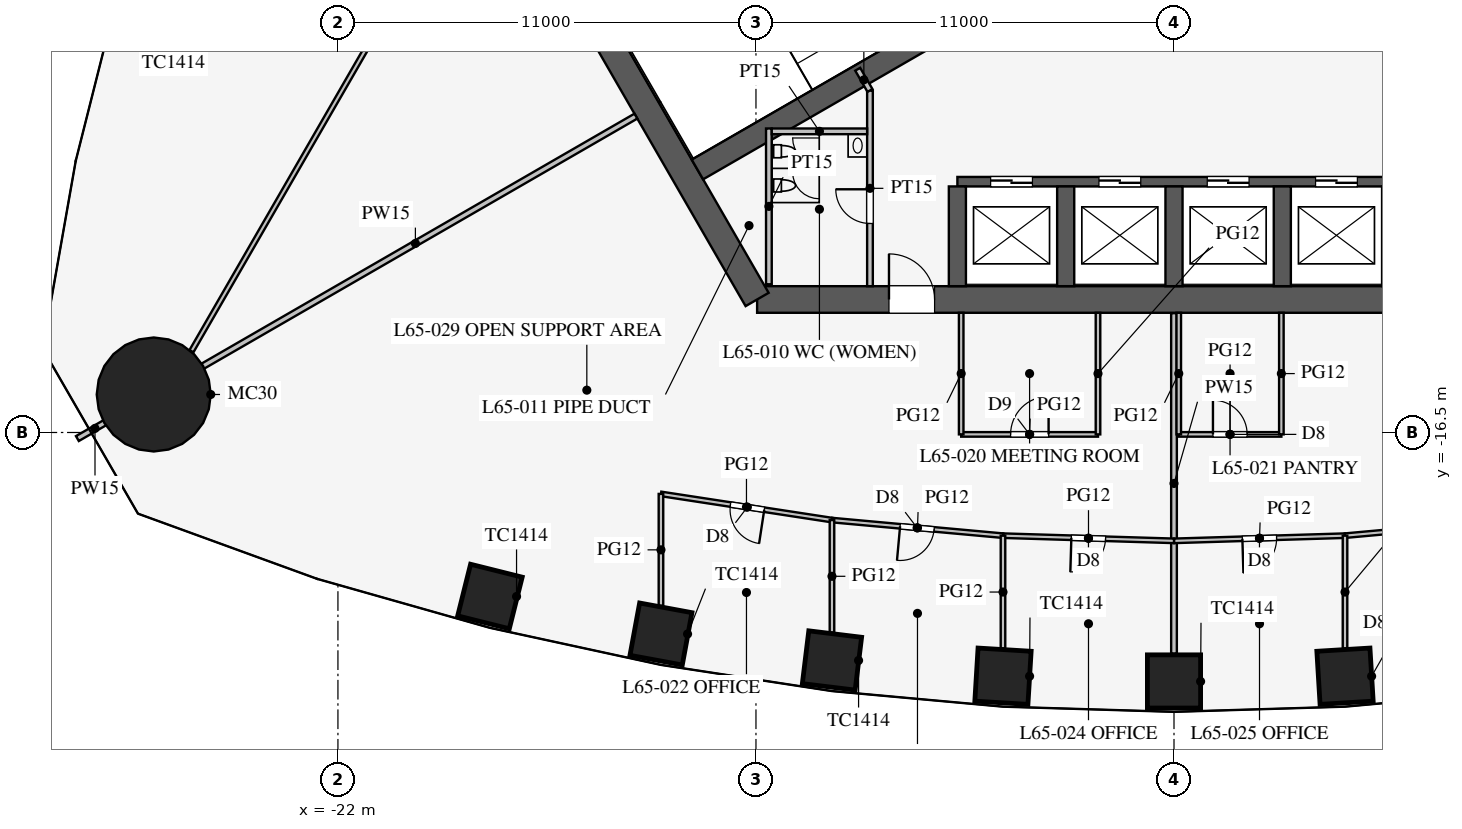
"""IFC4 building model, lengths in metres.
Left out: names, types, materials, properties, quantities, classifications, styles, units other than length and angle.
Written with IfcOpenShell. Run it as: python <this file> out.ifc"""

import sys

from ifc_helpers import new_model, si_unit, direction, frame, frame_2d, origin, origin_2d, place, context, subcontext, project, spatial, rectangle, circle, extrude, element, fill, save


model = new_model("IFC4")
c1 = context("Model", 3, precision=1e-05, world=origin(), true_north=direction((0.0, 1.0)))
c2 = subcontext(c1, "Body", "Model", "MODEL_VIEW")
j1 = project(units=[si_unit("LENGTHUNIT", "METRE"), si_unit("PLANEANGLEUNIT", "RADIAN")], contexts=[c1])
p1 = place(None, origin())
s1 = spatial("IfcSite", under=j1, at=p1, CompositionType="ELEMENT")
p2 = place(p1, origin())
s2 = spatial("IfcBuilding", under=s1, at=p2, CompositionType="ELEMENT")
p3 = place(p2, frame((0.0, 0.0, 284.7)))
s3 = spatial("IfcBuildingStorey", under=s2, at=p3, CompositionType="ELEMENT", Elevation=284.7)
for number, where, z_axis, x_axis in (
    (1, (-18.0, -20.816, 0.0), (0.0, 0.0, 1.0), (0.97, -0.242, 0.0)),
    (2, (-13.5, -21.803, 0.0), (0.0, 0.0, 1.0), (0.983, -0.182, 0.0)),
    (3, (-9.0, -22.499, 0.0), (0.0, 0.0, 1.0), (0.993, -0.121, 0.0)),
    (4, (-4.5, -22.914, 0.0), (0.0, 0.0, 1.0), (0.998, -0.061, 0.0)),
    (5, (0.0, -23.052, 0.0), (0.0, 0.0, 1.0), (1.0, 0.0, 0.0)),
    (6, (4.5, -22.914, 0.0), (0.0, 0.0, 1.0), (0.998, 0.061, 0.0)),
):
    element("IfcColumn", number, at=place(p3, frame(where, z_axis=z_axis, x_axis=x_axis)), inside=s3, PredefinedType="COLUMN", context=c2, shape_type="SweptSolid", body=[
        extrude(rectangle(XDim=1.4, YDim=1.4, at=origin_2d()), origin(), (0.0, 0.0, 1.0), 4.2),
    ])
p4 = place(p3, frame((-26.847, -15.5, 0.0), z_axis=(0.0, 0.0, 1.0), x_axis=(1.0, 0.0, 0.0)))
e7 = element("IfcColumn", 7, at=p4, inside=s3, PredefinedType="COLUMN", context=c2, shape_type="SweptSolid", body=[
    extrude(circle(Radius=1.5, at=origin_2d()), origin(), (0.0, 0.0, 1.0), 4.2),
])
p5 = place(p3, frame((-10.97, -13.0, 0.0), z_axis=(0.0, 0.0, 1.0), x_axis=(1.0, 0.0, 0.0)))
e8 = element("IfcWall", 8, at=p5, inside=s3, PredefinedType="SHEAR", context=c2, shape_type="SweptSolid", body=[
    extrude(rectangle(XDim=21.939, YDim=0.7, at=frame_2d((10.97, 0.0))), origin(), (0.0, 0.0, 1.0), 4.2),
])
p6 = place(p5, frame((17.27, 0.0, 0.0)))
e9 = element("IfcOpeningElement", 9, at=p6, cuts=e8, PredefinedType="OPENING", context=c2, shape_type="SweptSolid", body=[
    extrude(rectangle(XDim=1.2, YDim=2.1, at=frame_2d((0.6, 1.05))), frame((0.0, 0.36, 0.0), z_axis=(0.0, -1.0, 0.0), x_axis=(1.0, 0.0, 0.0)), (0.0, 0.0, 1.0), 0.72),
])
p7 = place(p5, frame((3.47, 0.0, 0.0)))
e10 = element("IfcOpeningElement", 10, at=p7, cuts=e8, PredefinedType="OPENING", context=c2, shape_type="SweptSolid", body=[
    extrude(rectangle(XDim=1.2, YDim=2.1, at=frame_2d((0.6, 1.05))), frame((0.0, 0.36, 0.0), z_axis=(0.0, -1.0, 0.0), x_axis=(1.0, 0.0, 0.0)), (0.0, 0.0, 1.0), 0.72),
])
p8 = place(p3, frame((-16.743, -3.0, 0.0), z_axis=(0.0, 0.0, 1.0), x_axis=(0.499995765644, -0.866027848477, 0.0)))
e11 = element("IfcWall", 11, at=p8, inside=s3, PredefinedType="SHEAR", context=c2, shape_type="SweptSolid", body=[
    extrude(rectangle(XDim=11.547, YDim=0.7, at=frame_2d((5.773, 0.0))), origin(), (0.0, 0.0, 1.0), 4.2),
])
p9 = place(p3, frame((-5.7, -9.9, 0.0), z_axis=(0.0, 0.0, 1.0), x_axis=(1.0, 0.0, 0.0)))
e12 = element("IfcWall", 12, at=p9, inside=s3, PredefinedType="SHEAR", context=c2, shape_type="SweptSolid", body=[
    extrude(rectangle(XDim=11.4, YDim=0.25, at=frame_2d((5.7, 0.0))), origin(), (0.0, 0.0, 1.0), 4.2),
])
p10 = place(p9, frame((0.875, 0.0, 0.0)))
e13 = element("IfcOpeningElement", 13, at=p10, cuts=e12, PredefinedType="OPENING", context=c2, shape_type="SweptSolid", body=[
    extrude(rectangle(XDim=1.1, YDim=2.2, at=frame_2d((0.55, 1.1))), frame((0.0, 0.135, 0.0), z_axis=(0.0, -1.0, 0.0), x_axis=(1.0, 0.0, 0.0)), (0.0, 0.0, 1.0), 0.27),
])
p11 = place(p9, frame((3.725, 0.0, 0.0)))
e14 = element("IfcOpeningElement", 14, at=p11, cuts=e12, PredefinedType="OPENING", context=c2, shape_type="SweptSolid", body=[
    extrude(rectangle(XDim=1.1, YDim=2.2, at=frame_2d((0.55, 1.1))), frame((0.0, 0.135, 0.0), z_axis=(0.0, -1.0, 0.0), x_axis=(1.0, 0.0, 0.0)), (0.0, 0.0, 1.0), 0.27),
])
p12 = place(p9, frame((6.575, 0.0, 0.0)))
e15 = element("IfcOpeningElement", 15, at=p12, cuts=e12, PredefinedType="OPENING", context=c2, shape_type="SweptSolid", body=[
    extrude(rectangle(XDim=1.1, YDim=2.2, at=frame_2d((0.55, 1.1))), frame((0.0, 0.135, 0.0), z_axis=(0.0, -1.0, 0.0), x_axis=(1.0, 0.0, 0.0)), (0.0, 0.0, 1.0), 0.27),
])
p13 = place(p9, frame((9.425, 0.0, 0.0)))
e16 = element("IfcOpeningElement", 16, at=p13, cuts=e12, PredefinedType="OPENING", context=c2, shape_type="SweptSolid", body=[
    extrude(rectangle(XDim=1.1, YDim=2.2, at=frame_2d((0.55, 1.1))), frame((0.0, 0.135, 0.0), z_axis=(0.0, -1.0, 0.0), x_axis=(1.0, 0.0, 0.0)), (0.0, 0.0, 1.0), 0.27),
])
for number, where, z_axis, x_axis in (
    (17, (-5.7, -10.025, 0.0), (0.0, 0.0, 1.0), (0.0, -1.0, 0.0)),
    (18, (-2.85, -10.025, 0.0), (0.0, 0.0, 1.0), (0.0, -1.0, 0.0)),
    (19, (0.0, -10.025, 0.0), (0.0, 0.0, 1.0), (0.0, -1.0, 0.0)),
    (20, (2.85, -10.025, 0.0), (0.0, 0.0, 1.0), (0.0, -1.0, 0.0)),
    (21, (5.7, -10.025, 0.0), (0.0, 0.0, 1.0), (0.0, -1.0, 0.0)),
):
    element("IfcWall", number, at=place(p3, frame(where, z_axis=z_axis, x_axis=x_axis)), inside=s3, PredefinedType="SHEAR", context=c2, shape_type="SweptSolid", body=[
        extrude(rectangle(XDim=2.625, YDim=0.45, at=frame_2d((1.312, 0.0))), origin(), (0.0, 0.0, 1.0), 4.2),
    ])
for number, where, z_axis, x_axis in (
    (22, (4.638, -5.016, 0.0), (0.0, 0.0, 1.0), (0.866, -0.5, 0.0)),
    (23, (-4.638, -5.016, 0.0), (0.0, 0.0, 1.0), (-0.866, -0.5, 0.0)),
):
    element("IfcWall", number, at=place(p3, frame(where, z_axis=z_axis, x_axis=x_axis)), inside=s3, PredefinedType="SHEAR", context=c2, shape_type="SweptSolid", body=[
        extrude(rectangle(XDim=9.125, YDim=0.6, at=frame_2d((4.562, 0.0))), origin(), (0.0, 0.0, 1.0), 4.2),
    ])
p14 = place(p3, frame((-8.0, -7.5, 0.0), z_axis=(0.0, 0.0, 1.0), x_axis=(0.0, -1.0, 0.0)))
e24 = element("IfcWall", 24, at=p14, inside=s3, PredefinedType="PARTITIONING", context=c2, shape_type="SweptSolid", body=[
    extrude(rectangle(XDim=5.15, YDim=0.15, at=frame_2d((2.575, 0.0))), origin(), (0.0, 0.0, 1.0), 4.0),
])
p15 = place(p14, frame((2.6, 0.0, 0.0)))
e25 = element("IfcOpeningElement", 25, at=p15, cuts=e24, PredefinedType="OPENING", context=c2, shape_type="SweptSolid", body=[
    extrude(rectangle(XDim=0.9, YDim=2.1, at=frame_2d((0.45, 1.05))), frame((0.0, 0.085, 0.0), z_axis=(0.0, -1.0, 0.0), x_axis=(1.0, 0.0, 0.0)), (0.0, 0.0, 1.0), 0.17),
])
p16 = place(p3, frame((-8.0, -7.5, 0.0), z_axis=(0.0, 0.0, 1.0), x_axis=(-0.499842556608, 0.866116284689, 0.0)))
e26 = element("IfcWall", 26, at=p16, inside=s3, PredefinedType="PARTITIONING", context=c2, shape_type="SweptSolid", body=[
    extrude(rectangle(XDim=0.645, YDim=0.15, at=frame_2d((0.323, 0.0))), origin(), (0.0, 0.0, 1.0), 4.0),
])
p17 = place(p3, frame((-10.66, -8.5, 0.0), z_axis=(0.0, 0.0, 1.0), x_axis=(0.0, -1.0, 0.0)))
e27 = element("IfcWall", 27, at=p17, inside=s3, PredefinedType="PARTITIONING", context=c2, shape_type="SweptSolid", body=[
    extrude(rectangle(XDim=4.1, YDim=0.15, at=frame_2d((2.05, 0.0))), origin(), (0.0, 0.0, 1.0), 4.0),
])
p18 = place(p3, frame((-8.075, -8.575, 0.0), z_axis=(0.0, 0.0, 1.0), x_axis=(-1.0, 0.0, 0.0)))
e28 = element("IfcWall", 28, at=p18, inside=s3, PredefinedType="PARTITIONING", context=c2, shape_type="SweptSolid", body=[
    extrude(rectangle(XDim=2.51, YDim=0.15, at=frame_2d((1.255, 0.0))), origin(), (0.0, 0.0, 1.0), 4.0),
])
p19 = place(p3, frame((-14.159, -8.175, 0.0), z_axis=(0.0, 0.0, 1.0), x_axis=(-0.866026905467, -0.499997399001, 0.0)))
e29 = element("IfcWall", 29, at=p19, inside=s3, PredefinedType="PARTITIONING", context=c2, shape_type="SweptSolid", body=[
    extrude(rectangle(XDim=13.4, YDim=0.15, at=frame_2d((6.7, 0.0))), origin(), (0.0, 0.0, 1.0), 2.5),
])
p20 = place(p3, frame((-27.929, -16.125, 0.0), z_axis=(0.0, 0.0, 1.0), x_axis=(-0.866086810508, -0.499893625349, 0.0)))
e30 = element("IfcWall", 30, at=p20, inside=s3, PredefinedType="PARTITIONING", context=c2, shape_type="SweptSolid", body=[
    extrude(rectangle(XDim=1.07, YDim=0.15, at=frame_2d((0.535, 0.0))), origin(), (0.0, 0.0, 1.0), 2.5),
])
p21 = place(p3, frame((0.0, -13.36, 0.0), z_axis=(0.0, 0.0, 1.0), x_axis=(0.0, -1.0, 0.0)))
e31 = element("IfcWall", 31, at=p21, inside=s3, PredefinedType="PARTITIONING", context=c2, shape_type="SweptSolid", body=[
    extrude(rectangle(XDim=8.961, YDim=0.15, at=frame_2d((4.481, 0.0))), origin(), (0.0, 0.0, 1.0), 3.0),
])
p22 = place(p3, frame((0.125, -16.55, 0.0), z_axis=(0.0, 0.0, 1.0), x_axis=(1.0, 0.0, 0.0)))
e32 = element("IfcWall", 32, at=p22, inside=s3, PredefinedType="PARTITIONING", context=c2, shape_type="SweptSolid", body=[
    extrude(rectangle(XDim=2.7, YDim=0.12, at=frame_2d((1.35, 0.0))), origin(), (0.0, 0.0, 1.0), 2.9),
])
p23 = place(p22, frame((0.9, 0.0, 0.15)))
e33 = element("IfcOpeningElement", 33, at=p23, cuts=e32, PredefinedType="OPENING", context=c2, shape_type="SweptSolid", body=[
    extrude(rectangle(XDim=0.9, YDim=2.1, at=frame_2d((0.45, 1.05))), frame((0.0, 0.07, 0.0), z_axis=(0.0, -1.0, 0.0), x_axis=(1.0, 0.0, 0.0)), (0.0, 0.0, 1.0), 0.14),
])
p24 = place(p3, frame((-5.6, -16.55, 0.0), z_axis=(0.0, 0.0, 1.0), x_axis=(1.0, 0.0, 0.0)))
e34 = element("IfcWall", 34, at=p24, inside=s3, PredefinedType="PARTITIONING", context=c2, shape_type="SweptSolid", body=[
    extrude(rectangle(XDim=3.6, YDim=0.12, at=frame_2d((1.8, 0.0))), origin(), (0.0, 0.0, 1.0), 2.9),
])
p25 = place(p24, frame((1.3, 0.0, 0.15)))
e35 = element("IfcOpeningElement", 35, at=p25, cuts=e34, PredefinedType="OPENING", context=c2, shape_type="SweptSolid", body=[
    extrude(rectangle(XDim=1.0, YDim=2.1, at=frame_2d((0.5, 1.05))), frame((0.0, 0.07, 0.0), z_axis=(0.0, -1.0, 0.0), x_axis=(1.0, 0.0, 0.0)), (0.0, 0.0, 1.0), 0.14),
])
for number, where, z_axis, x_axis in (
    (36, (0.125, -13.35, 0.0), (0.0, 0.0, 1.0), (0.0, -1.0, 0.0)),
    (37, (2.825, -13.35, 0.0), (0.0, 0.0, 1.0), (0.0, -1.0, 0.0)),
    (38, (-2.0, -13.35, 0.0), (0.0, 0.0, 1.0), (0.0, -1.0, 0.0)),
    (39, (-5.6, -13.35, 0.0), (0.0, 0.0, 1.0), (0.0, -1.0, 0.0)),
):
    element("IfcWall", number, at=place(p3, frame(where, z_axis=z_axis, x_axis=x_axis)), inside=s3, PredefinedType="PARTITIONING", context=c2, shape_type="SweptSolid", body=[
        extrude(rectangle(XDim=3.2, YDim=0.12, at=frame_2d((1.6, 0.0))), origin(), (0.0, 0.0, 1.0), 2.9),
    ])
p26 = place(p3, frame((0.0, -19.352, 0.0), z_axis=(0.0, 0.0, 1.0), x_axis=(0.999542074227, 0.030259574513, 0.0)))
e40 = element("IfcWall", 40, at=p26, inside=s3, PredefinedType="PARTITIONING", context=c2, shape_type="SweptSolid", body=[
    extrude(rectangle(XDim=4.502, YDim=0.12, at=frame_2d((2.251, 0.0))), origin(), (0.0, 0.0, 1.0), 2.9),
])
p27 = place(p26, frame((1.8, 0.0, 0.15)))
e41 = element("IfcOpeningElement", 41, at=p27, cuts=e40, PredefinedType="OPENING", context=c2, shape_type="SweptSolid", body=[
    extrude(rectangle(XDim=0.9, YDim=2.1, at=frame_2d((0.45, 1.05))), frame((0.0, 0.07, 0.0), z_axis=(0.0, -1.0, 0.0), x_axis=(1.0, 0.0, 0.0)), (0.0, 0.0, 1.0), 0.14),
])
p28 = place(p3, frame((4.5, -19.215, 0.0), z_axis=(0.0, 0.0, 1.0), x_axis=(0.995871921504, 0.090769576179, 0.0)))
e42 = element("IfcWall", 42, at=p28, inside=s3, PredefinedType="PARTITIONING", context=c2, shape_type="SweptSolid", body=[
    extrude(rectangle(XDim=4.519, YDim=0.12, at=frame_2d((2.259, 0.0))), origin(), (0.0, 0.0, 1.0), 2.9),
])
p29 = place(p28, frame((1.8, 0.0, 0.15)))
e43 = element("IfcOpeningElement", 43, at=p29, cuts=e42, PredefinedType="OPENING", context=c2, shape_type="SweptSolid", body=[
    extrude(rectangle(XDim=0.9, YDim=2.1, at=frame_2d((0.45, 1.05))), frame((0.0, 0.07, 0.0), z_axis=(0.0, -1.0, 0.0), x_axis=(1.0, 0.0, 0.0)), (0.0, 0.0, 1.0), 0.14),
])
p30 = place(p3, frame((-13.5, -18.116, 0.0), z_axis=(0.0, 0.0, 1.0), x_axis=(0.988481794406, -0.151339823341, 0.0)))
e44 = element("IfcWall", 44, at=p30, inside=s3, PredefinedType="PARTITIONING", context=c2, shape_type="SweptSolid", body=[
    extrude(rectangle(XDim=4.552, YDim=0.12, at=frame_2d((2.276, 0.0))), origin(), (0.0, 0.0, 1.0), 2.9),
])
p31 = place(p30, frame((1.85, 0.0, 0.15)))
e45 = element("IfcOpeningElement", 45, at=p31, cuts=e44, PredefinedType="OPENING", context=c2, shape_type="SweptSolid", body=[
    extrude(rectangle(XDim=0.9, YDim=2.1, at=frame_2d((0.45, 1.05))), frame((0.0, 0.07, 0.0), z_axis=(0.0, -1.0, 0.0), x_axis=(1.0, 0.0, 0.0)), (0.0, 0.0, 1.0), 0.14),
])
p32 = place(p3, frame((-4.5, -19.215, 0.0), z_axis=(0.0, 0.0, 1.0), x_axis=(0.999542074227, -0.030259574513, 0.0)))
e46 = element("IfcWall", 46, at=p32, inside=s3, PredefinedType="PARTITIONING", context=c2, shape_type="SweptSolid", body=[
    extrude(rectangle(XDim=4.502, YDim=0.12, at=frame_2d((2.251, 0.0))), origin(), (0.0, 0.0, 1.0), 2.9),
])
p33 = place(p32, frame((1.8, 0.0, 0.15)))
e47 = element("IfcOpeningElement", 47, at=p33, cuts=e46, PredefinedType="OPENING", context=c2, shape_type="SweptSolid", body=[
    extrude(rectangle(XDim=0.9, YDim=2.1, at=frame_2d((0.45, 1.05))), frame((0.0, 0.07, 0.0), z_axis=(0.0, -1.0, 0.0), x_axis=(1.0, 0.0, 0.0)), (0.0, 0.0, 1.0), 0.14),
])
p34 = place(p3, frame((-9.0, -18.805, 0.0), z_axis=(0.0, 0.0, 1.0), x_axis=(0.995871921504, -0.090769576179, 0.0)))
e48 = element("IfcWall", 48, at=p34, inside=s3, PredefinedType="PARTITIONING", context=c2, shape_type="SweptSolid", body=[
    extrude(rectangle(XDim=4.519, YDim=0.12, at=frame_2d((2.259, 0.0))), origin(), (0.0, 0.0, 1.0), 2.9),
])
p35 = place(p34, frame((1.8, 0.0, 0.15)))
e49 = element("IfcOpeningElement", 49, at=p35, cuts=e48, PredefinedType="OPENING", context=c2, shape_type="SweptSolid", body=[
    extrude(rectangle(XDim=0.9, YDim=2.1, at=frame_2d((0.45, 1.05))), frame((0.0, 0.07, 0.0), z_axis=(0.0, -1.0, 0.0), x_axis=(1.0, 0.0, 0.0)), (0.0, 0.0, 1.0), 0.14),
])
p36 = place(p3, frame((4.5, -19.215, 0.0), z_axis=(0.0, 0.0, 1.0), x_axis=(0.0, -1.0, 0.0)))
e50 = element("IfcWall", 50, at=p36, inside=s3, PredefinedType="PARTITIONING", context=c2, shape_type="SweptSolid", body=[
    extrude(rectangle(XDim=2.967, YDim=0.12, at=frame_2d((1.484, 0.0))), origin(), (0.0, 0.0, 1.0), 2.9),
])
p37 = place(p3, frame((-13.5, -18.116, 0.0), z_axis=(0.0, 0.0, 1.0), x_axis=(0.0, -1.0, 0.0)))
e51 = element("IfcWall", 51, at=p37, inside=s3, PredefinedType="PARTITIONING", context=c2, shape_type="SweptSolid", body=[
    extrude(rectangle(XDim=2.944, YDim=0.12, at=frame_2d((1.472, 0.0))), origin(), (0.0, 0.0, 1.0), 2.8),
])
p38 = place(p3, frame((-4.5, -19.215, 0.0), z_axis=(0.0, 0.0, 1.0), x_axis=(0.0, -1.0, 0.0)))
e52 = element("IfcWall", 52, at=p38, inside=s3, PredefinedType="PARTITIONING", context=c2, shape_type="SweptSolid", body=[
    extrude(rectangle(XDim=2.967, YDim=0.12, at=frame_2d((1.484, 0.0))), origin(), (0.0, 0.0, 1.0), 2.9),
])
p39 = place(p3, frame((-9.0, -18.805, 0.0), z_axis=(0.0, 0.0, 1.0), x_axis=(0.0, -1.0, 0.0)))
e53 = element("IfcWall", 53, at=p39, inside=s3, PredefinedType="PARTITIONING", context=c2, shape_type="SweptSolid", body=[
    extrude(rectangle(XDim=2.959, YDim=0.12, at=frame_2d((1.479, 0.0))), origin(), (0.0, 0.0, 1.0), 2.9),
])
p40 = place(p3, frame((-0.49, 29.571, 0.0), z_axis=(0.0, 0.0, 1.0), x_axis=(-0.499999496503, -0.866025694478, 0.0)))
e54 = element("IfcWall", 54, at=p40, inside=s3, PredefinedType="PARTITIONING", context=c2, shape_type="SweptSolid", body=[
    extrude(rectangle(XDim=50.728, YDim=0.12, at=frame_2d((25.364, 0.0))), origin(), (0.0, 0.0, 1.0), 2.9),
])
p41 = place(p40, frame((9.8, 0.0, 0.15)))
e55 = element("IfcOpeningElement", 55, at=p41, cuts=e54, PredefinedType="OPENING", context=c2, shape_type="SweptSolid", body=[
    extrude(rectangle(XDim=1.8, YDim=2.1, at=frame_2d((0.9, 1.05))), frame((0.0, 0.07, 0.0), z_axis=(0.0, -1.0, 0.0), x_axis=(1.0, 0.0, 0.0)), (0.0, 0.0, 1.0), 0.14),
])
p42 = place(p40, frame((39.15, 0.0, 0.15)))
e56 = element("IfcOpeningElement", 56, at=p42, cuts=e54, PredefinedType="OPENING", context=c2, shape_type="SweptSolid", body=[
    extrude(rectangle(XDim=1.8, YDim=2.1, at=frame_2d((0.9, 1.05))), frame((0.0, 0.07, 0.0), z_axis=(0.0, -1.0, 0.0), x_axis=(1.0, 0.0, 0.0)), (0.0, 0.0, 1.0), 0.14),
])
p43 = place(p15, frame((0.9, 0.0, 0.0), z_axis=(0.0, 0.0, 1.0), x_axis=(-1.0, 0.0, 0.0)))
e57 = element("IfcDoor", 57, at=p43, inside=s3, OperationType="SINGLE_SWING_RIGHT", PredefinedType="DOOR", context=c2, shape_type="SweptSolid", body=[
    extrude(rectangle(XDim=0.9, YDim=2.1, at=frame_2d((0.45, 1.05))), frame((0.0, 0.025, 0.0), z_axis=(0.0, -1.0, 0.0), x_axis=(1.0, 0.0, 0.0)), (0.0, 0.0, 1.0), 0.05),
])
fill(e25, e57)
p44 = place(p7, origin())
e58 = element("IfcDoor", 58, at=p44, inside=s3, OperationType="SINGLE_SWING_LEFT", PredefinedType="DOOR", context=c2, shape_type="SweptSolid", body=[
    extrude(rectangle(XDim=1.2, YDim=2.1, at=frame_2d((0.6, 1.05))), frame((0.0, 0.025, 0.0), z_axis=(0.0, -1.0, 0.0), x_axis=(1.0, 0.0, 0.0)), (0.0, 0.0, 1.0), 0.05),
])
fill(e10, e58)
p45 = place(p25, origin())
e59 = element("IfcDoor", 59, at=p45, inside=s3, OperationType="SINGLE_SWING_RIGHT", PredefinedType="DOOR", context=c2, shape_type="SweptSolid", body=[
    extrude(rectangle(XDim=1.0, YDim=2.1, at=frame_2d((0.5, 1.05))), frame((0.0, 0.025, 0.0), z_axis=(0.0, -1.0, 0.0), x_axis=(1.0, 0.0, 0.0)), (0.0, 0.0, 1.0), 0.05),
])
fill(e35, e59)
p46 = place(p23, origin())
e60 = element("IfcDoor", 60, at=p46, inside=s3, OperationType="SINGLE_SWING_LEFT", PredefinedType="DOOR", context=c2, shape_type="SweptSolid", body=[
    extrude(rectangle(XDim=0.9, YDim=2.1, at=frame_2d((0.45, 1.05))), frame((0.0, 0.025, 0.0), z_axis=(0.0, -1.0, 0.0), x_axis=(1.0, 0.0, 0.0)), (0.0, 0.0, 1.0), 0.05),
])
fill(e33, e60)
p47 = place(p31, frame((0.9, 0.0, 0.0), z_axis=(0.0, 0.0, 1.0), x_axis=(-1.0, 0.0, 0.0)))
e61 = element("IfcDoor", 61, at=p47, inside=s3, OperationType="SINGLE_SWING_LEFT", PredefinedType="DOOR", context=c2, shape_type="SweptSolid", body=[
    extrude(rectangle(XDim=0.9, YDim=2.1, at=frame_2d((0.45, 1.05))), frame((0.0, 0.025, 0.0), z_axis=(0.0, -1.0, 0.0), x_axis=(1.0, 0.0, 0.0)), (0.0, 0.0, 1.0), 0.05),
])
fill(e45, e61)
p48 = place(p35, frame((0.9, 0.0, 0.0), z_axis=(0.0, 0.0, 1.0), x_axis=(-1.0, 0.0, 0.0)))
e62 = element("IfcDoor", 62, at=p48, inside=s3, OperationType="SINGLE_SWING_RIGHT", PredefinedType="DOOR", context=c2, shape_type="SweptSolid", body=[
    extrude(rectangle(XDim=0.9, YDim=2.1, at=frame_2d((0.45, 1.05))), frame((0.0, 0.025, 0.0), z_axis=(0.0, -1.0, 0.0), x_axis=(1.0, 0.0, 0.0)), (0.0, 0.0, 1.0), 0.05),
])
fill(e49, e62)
p49 = place(p33, frame((0.9, 0.0, 0.0), z_axis=(0.0, 0.0, 1.0), x_axis=(-1.0, 0.0, 0.0)))
e63 = element("IfcDoor", 63, at=p49, inside=s3, OperationType="SINGLE_SWING_RIGHT", PredefinedType="DOOR", context=c2, shape_type="SweptSolid", body=[
    extrude(rectangle(XDim=0.9, YDim=2.1, at=frame_2d((0.45, 1.05))), frame((0.0, 0.025, 0.0), z_axis=(0.0, -1.0, 0.0), x_axis=(1.0, 0.0, 0.0)), (0.0, 0.0, 1.0), 0.05),
])
fill(e47, e63)
p50 = place(p27, frame((0.9, 0.0, 0.0), z_axis=(0.0, 0.0, 1.0), x_axis=(-1.0, 0.0, 0.0)))
e64 = element("IfcDoor", 64, at=p50, inside=s3, OperationType="SINGLE_SWING_RIGHT", PredefinedType="DOOR", context=c2, shape_type="SweptSolid", body=[
    extrude(rectangle(XDim=0.9, YDim=2.1, at=frame_2d((0.45, 1.05))), frame((0.0, 0.025, 0.0), z_axis=(0.0, -1.0, 0.0), x_axis=(1.0, 0.0, 0.0)), (0.0, 0.0, 1.0), 0.05),
])
fill(e41, e64)
p51 = place(p10, origin())
e65 = element("IfcDoor", 65, at=p51, inside=s3, OperationType="DOUBLE_DOOR_SLIDING", PredefinedType="DOOR", context=c2, shape_type="SweptSolid", body=[
    extrude(rectangle(XDim=1.1, YDim=2.2, at=frame_2d((0.55, 1.1))), frame((0.0, 0.025, 0.0), z_axis=(0.0, -1.0, 0.0), x_axis=(1.0, 0.0, 0.0)), (0.0, 0.0, 1.0), 0.05),
])
fill(e13, e65)
p52 = place(p11, origin())
e66 = element("IfcDoor", 66, at=p52, inside=s3, OperationType="DOUBLE_DOOR_SLIDING", PredefinedType="DOOR", context=c2, shape_type="SweptSolid", body=[
    extrude(rectangle(XDim=1.1, YDim=2.2, at=frame_2d((0.55, 1.1))), frame((0.0, 0.025, 0.0), z_axis=(0.0, -1.0, 0.0), x_axis=(1.0, 0.0, 0.0)), (0.0, 0.0, 1.0), 0.05),
])
fill(e14, e66)
p53 = place(p12, origin())
e67 = element("IfcDoor", 67, at=p53, inside=s3, OperationType="DOUBLE_DOOR_SLIDING", PredefinedType="DOOR", context=c2, shape_type="SweptSolid", body=[
    extrude(rectangle(XDim=1.1, YDim=2.2, at=frame_2d((0.55, 1.1))), frame((0.0, 0.025, 0.0), z_axis=(0.0, -1.0, 0.0), x_axis=(1.0, 0.0, 0.0)), (0.0, 0.0, 1.0), 0.05),
])
fill(e15, e67)
p54 = place(p13, origin())
e68 = element("IfcDoor", 68, at=p54, inside=s3, OperationType="DOUBLE_DOOR_SLIDING", PredefinedType="DOOR", context=c2, shape_type="SweptSolid", body=[
    extrude(rectangle(XDim=1.1, YDim=2.2, at=frame_2d((0.55, 1.1))), frame((0.0, 0.025, 0.0), z_axis=(0.0, -1.0, 0.0), x_axis=(1.0, 0.0, 0.0)), (0.0, 0.0, 1.0), 0.05),
])
fill(e16, e68)
save(model, sys.argv[1])
